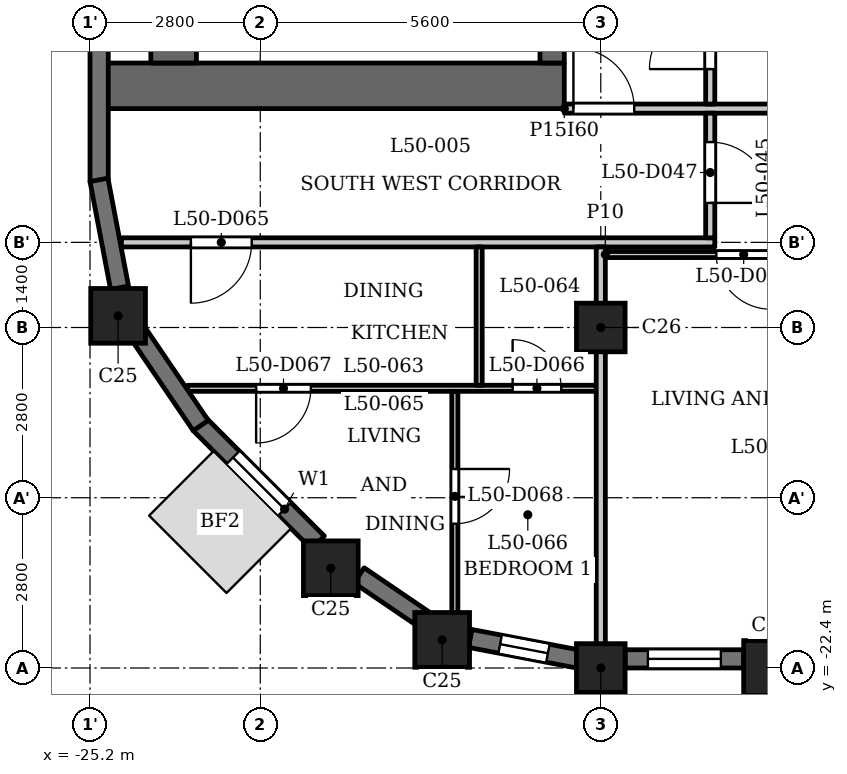
"""IFC4 building model, lengths in metres.
Left out: names, types, materials, properties, quantities, classifications, styles, units other than length and angle.
Written with IfcOpenShell. Run it as: python <this file> out.ifc"""

import sys

from ifc_helpers import new_model, si_unit, direction, frame, frame_2d, origin, origin_2d, place, context, subcontext, project, spatial, rectangle, extrude, element, fill, save


model = new_model("IFC4")
c1 = context("Model", 3, precision=1e-05, world=origin(), true_north=direction((0.0, 1.0)))
c2 = subcontext(c1, "Body", "Model", "MODEL_VIEW")
j1 = project(units=[si_unit("LENGTHUNIT", "METRE"), si_unit("PLANEANGLEUNIT", "RADIAN")], contexts=[c1])
p1 = place(None, origin())
s1 = spatial("IfcSite", under=j1, at=p1, CompositionType="ELEMENT")
p2 = place(p1, origin())
s2 = spatial("IfcBuilding", under=s1, at=p2, CompositionType="ELEMENT")
p3 = place(p2, frame((0.0, 0.0, 195.9)))
s3 = spatial("IfcBuildingStorey", under=s2, at=p3, CompositionType="ELEMENT", Elevation=195.9)
for number, where, z_axis, x_axis in (
    (1, (-19.409, -21.938, 0.0), (0.0, 0.0, 1.0), (1.0, 0.0, 0.0)),
    (2, (-14.0, -22.4, 0.0), (0.0, 0.0, 1.0), (1.0, 0.0, 0.0)),
    (3, (-24.738, -16.609, 0.0), (0.0, 0.0, 1.0), (1.0, 0.0, 0.0)),
    (4, (-21.24, -20.76, 0.0), (0.0, 0.0, 1.0), (1.0, 0.0, 0.0)),
):
    element("IfcColumn", number, at=place(p3, frame(where, z_axis=z_axis, x_axis=x_axis)), inside=s3, PredefinedType="COLUMN", context=c2, shape_type="SweptSolid", body=[
        extrude(rectangle(XDim=0.9, YDim=0.9, at=origin_2d()), origin(), (0.0, 0.0, 1.0), 3.5),
    ])
for number, where, z_axis, x_axis in (
    (5, (-16.8, -22.4, 0.0), (0.0, 0.0, 1.0), (1.0, 0.0, 0.0)),
    (6, (-16.8, -16.8, 0.0), (0.0, 0.0, 1.0), (1.0, 0.0, 0.0)),
):
    element("IfcColumn", number, at=place(p3, frame(where, z_axis=z_axis, x_axis=x_axis)), inside=s3, PredefinedType="COLUMN", context=c2, shape_type="SweptSolid", body=[
        extrude(rectangle(XDim=0.8, YDim=0.8, at=origin_2d()), origin(), (0.0, 0.0, 1.0), 3.5),
    ])
p4 = place(p3, frame((-23.397, -18.391, 0.0), z_axis=(0.0, 0.0, 1.0), x_axis=(0.707106781187, -0.707106781187, 0.0)))
e7 = element("IfcWall", 7, at=p4, inside=s3, PredefinedType="SOLIDWALL", context=c2, shape_type="SweptSolid", body=[
    extrude(rectangle(XDim=2.75, YDim=0.3, at=frame_2d((1.375, 0.0))), origin(), (0.0, 0.0, 1.0), 2.5),
])
p5 = place(p4, frame((0.775, 0.0, 0.6)))
e8 = element("IfcOpeningElement", 8, at=p5, cuts=e7, PredefinedType="OPENING", context=c2, shape_type="SweptSolid", body=[
    extrude(rectangle(XDim=1.2, YDim=1.55, at=frame_2d((0.6, 0.775))), frame((0.0, 0.16, 0.0), z_axis=(0.0, -1.0, 0.0), x_axis=(1.0, 0.0, 0.0)), (0.0, 0.0, 1.0), 0.32),
])
p6 = place(p3, frame((-20.775, -20.876, 0.0), z_axis=(0.0, 0.0, 1.0), x_axis=(0.827075824828, -0.562090366388, 0.0)))
e9 = element("IfcWall", 9, at=p6, inside=s3, PredefinedType="SOLIDWALL", context=c2, shape_type="SweptSolid", body=[
    extrude(rectangle(XDim=1.277, YDim=0.3, at=frame_2d((0.638, 0.0))), origin(), (0.0, 0.0, 1.0), 2.5),
])
p7 = place(p3, frame((-18.946, -21.914, 0.0), z_axis=(0.0, 0.0, 1.0), x_axis=(0.98230529033, -0.187286722942, 0.0)))
e10 = element("IfcWall", 10, at=p7, inside=s3, PredefinedType="SOLIDWALL", context=c2, shape_type="SweptSolid", body=[
    extrude(rectangle(XDim=1.799, YDim=0.3, at=frame_2d((0.899, 0.0))), origin(), (0.0, 0.0, 1.0), 2.5),
])
p8 = place(p7, frame((0.5, 0.0, 0.6)))
e11 = element("IfcOpeningElement", 11, at=p8, cuts=e10, PredefinedType="OPENING", context=c2, shape_type="SweptSolid", body=[
    extrude(rectangle(XDim=0.8, YDim=1.55, at=frame_2d((0.4, 0.775))), frame((0.0, 0.16, 0.0), z_axis=(0.0, -1.0, 0.0), x_axis=(1.0, 0.0, 0.0)), (0.0, 0.0, 1.0), 0.32),
])
p9 = place(p3, frame((-16.4, -22.25, 0.0), z_axis=(0.0, 0.0, 1.0), x_axis=(1.0, 0.0, 0.0)))
e12 = element("IfcWall", 12, at=p9, inside=s3, PredefinedType="SOLIDWALL", context=c2, shape_type="SweptSolid", body=[
    extrude(rectangle(XDim=1.95, YDim=0.3, at=frame_2d((0.975, 0.0))), origin(), (0.0, 0.0, 1.0), 2.5),
])
p10 = place(p9, frame((0.375, 0.0, 0.6)))
e13 = element("IfcOpeningElement", 13, at=p10, cuts=e12, PredefinedType="OPENING", context=c2, shape_type="SweptSolid", body=[
    extrude(rectangle(XDim=1.2, YDim=1.55, at=frame_2d((0.6, 0.775))), frame((0.0, 0.16, 0.0), z_axis=(0.0, -1.0, 0.0), x_axis=(1.0, 0.0, 0.0)), (0.0, 0.0, 1.0), 0.32),
])
p11 = place(p3, frame((-25.05, -11.65, 0.0), z_axis=(0.0, 0.0, 1.0), x_axis=(0.0, -1.0, 0.0)))
e14 = element("IfcWall", 14, at=p11, inside=s3, PredefinedType="SOLIDWALL", context=c2, shape_type="SweptSolid", body=[
    extrude(rectangle(XDim=2.75, YDim=0.3, at=frame_2d((1.375, 0.0))), origin(), (0.0, 0.0, 1.0), 2.5),
])
for number, where, z_axis, x_axis in (
    (15, (-25.053, -14.372, 0.0), (0.0, 0.0, 1.0), (0.187, -0.982, 0.0)),
    (16, (-24.394, -16.919, 0.0), (0.0, 0.0, 1.0), (0.562, -0.827, 0.0)),
):
    element("IfcWall", number, at=place(p3, frame(where, z_axis=z_axis, x_axis=x_axis)), inside=s3, PredefinedType="SOLIDWALL", context=c2, shape_type="SweptSolid", body=[
        extrude(rectangle(XDim=1.806, YDim=0.3, at=frame_2d((0.903, 0.0))), origin(), (0.0, 0.0, 1.0), 2.5),
    ])
p12 = place(p3, frame((-17.4, -12.825, 0.0), z_axis=(0.0, 0.0, 1.0), x_axis=(-1.0, 0.0, 0.0)))
e17 = element("IfcWall", 17, at=p12, inside=s3, PredefinedType="SHEAR", context=c2, shape_type="SweptSolid", body=[
    extrude(rectangle(XDim=7.6, YDim=0.75, at=frame_2d((3.8, 0.0))), origin(), (0.0, 0.0, 1.0), 3.2),
])
p13 = place(p3, frame((-17.6, -12.45, 0.0), z_axis=(0.0, 0.0, 1.0), x_axis=(0.0, 1.0, 0.0)))
e18 = element("IfcWall", 18, at=p13, inside=s3, PredefinedType="SHEAR", context=c2, shape_type="SweptSolid", body=[
    extrude(rectangle(XDim=24.9, YDim=0.4, at=frame_2d((12.45, 0.0))), origin(), (0.0, 0.0, 1.0), 3.2),
])
p14 = place(p13, frame((6.325, 0.0, 0.0)))
e19 = element("IfcOpeningElement", 19, at=p14, cuts=e18, PredefinedType="OPENING", context=c2, shape_type="SweptSolid", body=[
    extrude(rectangle(XDim=0.9, YDim=2.1, at=frame_2d((0.45, 1.05))), frame((0.0, 0.21, 0.0), z_axis=(0.0, -1.0, 0.0), x_axis=(1.0, 0.0, 0.0)), (0.0, 0.0, 1.0), 0.42),
])
p15 = place(p13, frame((9.925, 0.0, 0.0)))
e20 = element("IfcOpeningElement", 20, at=p15, cuts=e18, PredefinedType="OPENING", context=c2, shape_type="SweptSolid", body=[
    extrude(rectangle(XDim=0.9, YDim=2.1, at=frame_2d((0.45, 1.05))), frame((0.0, 0.21, 0.0), z_axis=(0.0, -1.0, 0.0), x_axis=(1.0, 0.0, 0.0)), (0.0, 0.0, 1.0), 0.42),
])
p16 = place(p13, frame((15.6, 0.0, 0.0)))
e21 = element("IfcOpeningElement", 21, at=p16, cuts=e18, PredefinedType="OPENING", context=c2, shape_type="SweptSolid", body=[
    extrude(rectangle(XDim=1.1, YDim=2.1, at=frame_2d((0.55, 1.05))), frame((0.0, 0.21, 0.0), z_axis=(0.0, -1.0, 0.0), x_axis=(1.0, 0.0, 0.0)), (0.0, 0.0, 1.0), 0.42),
])
p17 = place(p13, frame((18.0, 0.0, 0.0)))
e22 = element("IfcOpeningElement", 22, at=p17, cuts=e18, PredefinedType="OPENING", context=c2, shape_type="SweptSolid", body=[
    extrude(rectangle(XDim=1.1, YDim=2.1, at=frame_2d((0.55, 1.05))), frame((0.0, 0.21, 0.0), z_axis=(0.0, -1.0, 0.0), x_axis=(1.0, 0.0, 0.0)), (0.0, 0.0, 1.0), 0.42),
])
p18 = place(p13, frame((23.025, 0.0, 0.0)))
e23 = element("IfcOpeningElement", 23, at=p18, cuts=e18, PredefinedType="OPENING", context=c2, shape_type="SweptSolid", body=[
    extrude(rectangle(XDim=1.1, YDim=2.1, at=frame_2d((0.55, 1.05))), frame((0.0, 0.21, 0.0), z_axis=(0.0, -1.0, 0.0), x_axis=(1.0, 0.0, 0.0)), (0.0, 0.0, 1.0), 0.42),
])
p19 = place(p13, frame((0.775, 0.0, 0.0)))
e24 = element("IfcOpeningElement", 24, at=p19, cuts=e18, PredefinedType="OPENING", context=c2, shape_type="SweptSolid", body=[
    extrude(rectangle(XDim=1.1, YDim=2.1, at=frame_2d((0.55, 1.05))), frame((0.0, 0.21, 0.0), z_axis=(0.0, -1.0, 0.0), x_axis=(1.0, 0.0, 0.0)), (0.0, 0.0, 1.0), 0.42),
])
p20 = place(p13, frame((12.925, 0.0, 0.0)))
e25 = element("IfcOpeningElement", 25, at=p20, cuts=e18, PredefinedType="OPENING", context=c2, shape_type="SweptSolid", body=[
    extrude(rectangle(XDim=1.8, YDim=2.1, at=frame_2d((0.9, 1.05))), frame((0.0, 0.21, 0.0), z_axis=(0.0, -1.0, 0.0), x_axis=(1.0, 0.0, 0.0)), (0.0, 0.0, 1.0), 0.42),
])
p21 = place(p3, frame((-23.825, -12.45, 0.0), z_axis=(0.0, 0.0, 1.0), x_axis=(0.0, 1.0, 0.0)))
e26 = element("IfcWall", 26, at=p21, inside=s3, PredefinedType="SHEAR", context=c2, shape_type="SweptSolid", body=[
    extrude(rectangle(XDim=24.9, YDim=0.75, at=frame_2d((12.45, 0.0))), origin(), (0.0, 0.0, 1.0), 3.2),
])
p22 = place(p3, frame((-23.594, -17.8, 0.0), z_axis=(0.0, 0.0, 1.0), x_axis=(1.0, 0.0, 0.0)))
e27 = element("IfcWall", 27, at=p22, inside=s3, PredefinedType="PARTITIONING", context=c2, shape_type="SweptSolid", body=[
    extrude(rectangle(XDim=6.719, YDim=0.1, at=frame_2d((3.359, 0.0))), origin(), (0.0, 0.0, 1.0), 3.2),
])
p23 = place(p22, frame((5.344, 0.0, 0.0)))
e28 = element("IfcOpeningElement", 28, at=p23, cuts=e27, PredefinedType="OPENING", context=c2, shape_type="SweptSolid", body=[
    extrude(rectangle(XDim=0.8, YDim=2.1, at=frame_2d((0.4, 1.05))), frame((0.0, 0.06, 0.0), z_axis=(0.0, -1.0, 0.0), x_axis=(1.0, 0.0, 0.0)), (0.0, 0.0, 1.0), 0.12),
])
p24 = place(p22, frame((1.126, 0.0, 0.0)))
e29 = element("IfcOpeningElement", 29, at=p24, cuts=e27, PredefinedType="OPENING", context=c2, shape_type="SweptSolid", body=[
    extrude(rectangle(XDim=0.9, YDim=2.1, at=frame_2d((0.45, 1.05))), frame((0.0, 0.06, 0.0), z_axis=(0.0, -1.0, 0.0), x_axis=(1.0, 0.0, 0.0)), (0.0, 0.0, 1.0), 0.12),
])
p25 = place(p3, frame((-16.725, -15.6, 0.0), z_axis=(0.0, 0.0, 1.0), x_axis=(1.0, 0.0, 0.0)))
e30 = element("IfcWall", 30, at=p25, inside=s3, PredefinedType="PARTITIONING", context=c2, shape_type="SweptSolid", body=[
    extrude(rectangle(XDim=33.45, YDim=0.1, at=frame_2d((16.725, 0.0))), origin(), (0.0, 0.0, 1.0), 3.2),
])
p26 = place(p25, frame((4.075, 0.0, 0.0)))
e31 = element("IfcOpeningElement", 31, at=p26, cuts=e30, PredefinedType="OPENING", context=c2, shape_type="SweptSolid", body=[
    extrude(rectangle(XDim=0.8, YDim=2.1, at=frame_2d((0.4, 1.05))), frame((0.0, 0.06, 0.0), z_axis=(0.0, -1.0, 0.0), x_axis=(1.0, 0.0, 0.0)), (0.0, 0.0, 1.0), 0.12),
])
p27 = place(p25, frame((1.825, 0.0, 0.0)))
e32 = element("IfcOpeningElement", 32, at=p27, cuts=e30, PredefinedType="OPENING", context=c2, shape_type="SweptSolid", body=[
    extrude(rectangle(XDim=0.9, YDim=2.1, at=frame_2d((0.45, 1.05))), frame((0.0, 0.06, 0.0), z_axis=(0.0, -1.0, 0.0), x_axis=(1.0, 0.0, 0.0)), (0.0, 0.0, 1.0), 0.12),
])
p28 = place(p25, frame((9.675, 0.0, 0.0)))
e33 = element("IfcOpeningElement", 33, at=p28, cuts=e30, PredefinedType="OPENING", context=c2, shape_type="SweptSolid", body=[
    extrude(rectangle(XDim=0.8, YDim=2.1, at=frame_2d((0.4, 1.05))), frame((0.0, 0.06, 0.0), z_axis=(0.0, -1.0, 0.0), x_axis=(1.0, 0.0, 0.0)), (0.0, 0.0, 1.0), 0.12),
])
p29 = place(p25, frame((14.025, 0.0, 0.0)))
e34 = element("IfcOpeningElement", 34, at=p29, cuts=e30, PredefinedType="OPENING", context=c2, shape_type="SweptSolid", body=[
    extrude(rectangle(XDim=0.9, YDim=2.1, at=frame_2d((0.45, 1.05))), frame((0.0, 0.06, 0.0), z_axis=(0.0, -1.0, 0.0), x_axis=(1.0, 0.0, 0.0)), (0.0, 0.0, 1.0), 0.12),
])
p30 = place(p25, frame((20.875, 0.0, 0.0)))
e35 = element("IfcOpeningElement", 35, at=p30, cuts=e30, PredefinedType="OPENING", context=c2, shape_type="SweptSolid", body=[
    extrude(rectangle(XDim=0.8, YDim=2.1, at=frame_2d((0.4, 1.05))), frame((0.0, 0.06, 0.0), z_axis=(0.0, -1.0, 0.0), x_axis=(1.0, 0.0, 0.0)), (0.0, 0.0, 1.0), 0.12),
])
p31 = place(p25, frame((25.225, 0.0, 0.0)))
e36 = element("IfcOpeningElement", 36, at=p31, cuts=e30, PredefinedType="OPENING", context=c2, shape_type="SweptSolid", body=[
    extrude(rectangle(XDim=0.9, YDim=2.1, at=frame_2d((0.45, 1.05))), frame((0.0, 0.06, 0.0), z_axis=(0.0, -1.0, 0.0), x_axis=(1.0, 0.0, 0.0)), (0.0, 0.0, 1.0), 0.12),
])
p32 = place(p25, frame((28.475, 0.0, 0.0)))
e37 = element("IfcOpeningElement", 37, at=p32, cuts=e30, PredefinedType="OPENING", context=c2, shape_type="SweptSolid", body=[
    extrude(rectangle(XDim=0.8, YDim=2.1, at=frame_2d((0.4, 1.05))), frame((0.0, 0.06, 0.0), z_axis=(0.0, -1.0, 0.0), x_axis=(1.0, 0.0, 0.0)), (0.0, 0.0, 1.0), 0.12),
])
p33 = place(p25, frame((30.675, 0.0, 0.0)))
e38 = element("IfcOpeningElement", 38, at=p33, cuts=e30, PredefinedType="OPENING", context=c2, shape_type="SweptSolid", body=[
    extrude(rectangle(XDim=0.9, YDim=2.1, at=frame_2d((0.45, 1.05))), frame((0.0, 0.06, 0.0), z_axis=(0.0, -1.0, 0.0), x_axis=(1.0, 0.0, 0.0)), (0.0, 0.0, 1.0), 0.12),
])
p34 = place(p3, frame((-24.684, -15.4, 0.0), z_axis=(0.0, 0.0, 1.0), x_axis=(1.0, 0.0, 0.0)))
e39 = element("IfcWall", 39, at=p34, inside=s3, PredefinedType="PARTITIONING", context=c2, shape_type="SweptSolid", body=[
    extrude(rectangle(XDim=9.759, YDim=0.15, at=frame_2d((4.879, 0.0))), origin(), (0.0, 0.0, 1.0), 3.2),
])
p35 = place(p34, frame((1.143, 0.0, 0.0)))
e40 = element("IfcOpeningElement", 40, at=p35, cuts=e39, PredefinedType="OPENING", context=c2, shape_type="SweptSolid", body=[
    extrude(rectangle(XDim=1.0, YDim=2.1, at=frame_2d((0.5, 1.05))), frame((0.0, 0.085, 0.0), z_axis=(0.0, -1.0, 0.0), x_axis=(1.0, 0.0, 0.0)), (0.0, 0.0, 1.0), 0.17),
])
p36 = place(p3, frame((-17.4, -13.2, 0.0), z_axis=(0.0, 0.0, 1.0), x_axis=(1.0, 0.0, 0.0)))
e41 = element("IfcWall", 41, at=p36, inside=s3, PredefinedType="PARTITIONING", context=c2, shape_type="SweptSolid", body=[
    extrude(rectangle(XDim=34.8, YDim=0.15, at=frame_2d((17.4, 0.0))), origin(), (0.0, 0.0, 1.0), 3.2),
])
p37 = place(p36, frame((0.15, 0.0, 0.0)))
e42 = element("IfcOpeningElement", 42, at=p37, cuts=e41, PredefinedType="OPENING", context=c2, shape_type="SweptSolid", body=[
    extrude(rectangle(XDim=1.0, YDim=2.1, at=frame_2d((0.5, 1.05))), frame((0.0, 0.085, 0.0), z_axis=(0.0, -1.0, 0.0), x_axis=(1.0, 0.0, 0.0)), (0.0, 0.0, 1.0), 0.17),
])
p38 = place(p36, frame((33.55, 0.0, 0.0)))
e43 = element("IfcOpeningElement", 43, at=p38, cuts=e41, PredefinedType="OPENING", context=c2, shape_type="SweptSolid", body=[
    extrude(rectangle(XDim=1.0, YDim=2.1, at=frame_2d((0.5, 1.05))), frame((0.0, 0.085, 0.0), z_axis=(0.0, -1.0, 0.0), x_axis=(1.0, 0.0, 0.0)), (0.0, 0.0, 1.0), 0.17),
])
p39 = place(p36, frame((15.7, 0.0, 0.0)))
e44 = element("IfcOpeningElement", 44, at=p39, cuts=e41, PredefinedType="OPENING", context=c2, shape_type="SweptSolid", body=[
    extrude(rectangle(XDim=1.0, YDim=2.1, at=frame_2d((0.5, 1.05))), frame((0.0, 0.085, 0.0), z_axis=(0.0, -1.0, 0.0), x_axis=(1.0, 0.0, 0.0)), (0.0, 0.0, 1.0), 0.17),
])
p40 = place(p36, frame((26.9, 0.0, 0.0)))
e45 = element("IfcOpeningElement", 45, at=p40, cuts=e41, PredefinedType="OPENING", context=c2, shape_type="SweptSolid", body=[
    extrude(rectangle(XDim=1.0, YDim=2.1, at=frame_2d((0.5, 1.05))), frame((0.0, 0.085, 0.0), z_axis=(0.0, -1.0, 0.0), x_axis=(1.0, 0.0, 0.0)), (0.0, 0.0, 1.0), 0.17),
])
p41 = place(p3, frame((-19.2, -21.92, 0.0), z_axis=(0.0, 0.0, 1.0), x_axis=(0.0, 1.0, 0.0)))
e46 = element("IfcWall", 46, at=p41, inside=s3, PredefinedType="PARTITIONING", context=c2, shape_type="SweptSolid", body=[
    extrude(rectangle(XDim=4.07, YDim=0.1, at=frame_2d((2.035, 0.0))), origin(), (0.0, 0.0, 1.0), 3.2),
])
p42 = place(p41, frame((1.893, 0.0, 0.0)))
e47 = element("IfcOpeningElement", 47, at=p42, cuts=e46, PredefinedType="OPENING", context=c2, shape_type="SweptSolid", body=[
    extrude(rectangle(XDim=0.9, YDim=2.1, at=frame_2d((0.45, 1.05))), frame((0.0, 0.06, 0.0), z_axis=(0.0, -1.0, 0.0), x_axis=(1.0, 0.0, 0.0)), (0.0, 0.0, 1.0), 0.12),
])
p43 = place(p3, frame((-18.8, -17.75, 0.0), z_axis=(0.0, 0.0, 1.0), x_axis=(0.0, 1.0, 0.0)))
e48 = element("IfcWall", 48, at=p43, inside=s3, PredefinedType="PARTITIONING", context=c2, shape_type="SweptSolid", body=[
    extrude(rectangle(XDim=2.275, YDim=0.1, at=frame_2d((1.137, 0.0))), origin(), (0.0, 0.0, 1.0), 3.2),
])
p44 = place(p3, frame((-16.8, -22.31, 0.0), z_axis=(0.0, 0.0, 1.0), x_axis=(0.0, 1.0, 0.0)))
e49 = element("IfcWall", 49, at=p44, inside=s3, PredefinedType="PARTITIONING", context=c2, shape_type="SweptSolid", body=[
    extrude(rectangle(XDim=6.835, YDim=0.15, at=frame_2d((3.417, 0.0))), origin(), (0.0, 0.0, 1.0), 2.55),
])
p45 = place(p3, frame((-15.0, -15.325, 0.0), z_axis=(0.0, 0.0, 1.0), x_axis=(0.0, 1.0, 0.0)))
e50 = element("IfcWall", 50, at=p45, inside=s3, PredefinedType="PARTITIONING", context=c2, shape_type="SweptSolid", body=[
    extrude(rectangle(XDim=2.05, YDim=0.15, at=frame_2d((1.025, 0.0))), origin(), (0.0, 0.0, 1.0), 3.2),
])
p46 = place(p45, frame((0.574, 0.0, 0.0)))
e51 = element("IfcOpeningElement", 51, at=p46, cuts=e50, PredefinedType="OPENING", context=c2, shape_type="SweptSolid", body=[
    extrude(rectangle(XDim=1.0, YDim=2.1, at=frame_2d((0.5, 1.05))), frame((0.0, 0.085, 0.0), z_axis=(0.0, -1.0, 0.0), x_axis=(1.0, 0.0, 0.0)), (0.0, 0.0, 1.0), 0.17),
])
p47 = place(p3, frame((-15.0, -13.125, 0.0), z_axis=(0.0, 0.0, 1.0), x_axis=(0.0, 1.0, 0.0)))
e52 = element("IfcWall", 52, at=p47, inside=s3, PredefinedType="PARTITIONING", context=c2, shape_type="SweptSolid", body=[
    extrude(rectangle(XDim=6.356, YDim=0.15, at=frame_2d((3.178, 0.0))), origin(), (0.0, 0.0, 1.0), 3.2),
])
p48 = place(p47, frame((0.575, 0.0, 0.0)))
e53 = element("IfcOpeningElement", 53, at=p48, cuts=e52, PredefinedType="OPENING", context=c2, shape_type="SweptSolid", body=[
    extrude(rectangle(XDim=1.0, YDim=2.1, at=frame_2d((0.5, 1.05))), frame((0.0, 0.085, 0.0), z_axis=(0.0, -1.0, 0.0), x_axis=(1.0, 0.0, 0.0)), (0.0, 0.0, 1.0), 0.17),
])
p49 = place(p48, origin())
e54 = element("IfcDoor", 54, at=p49, inside=s3, OperationType="SINGLE_SWING_RIGHT", PredefinedType="DOOR", context=c2, shape_type="SweptSolid", body=[
    extrude(rectangle(XDim=1.0, YDim=2.1, at=frame_2d((0.5, 1.05))), frame((0.0, 0.025, 0.0), z_axis=(0.0, -1.0, 0.0), x_axis=(1.0, 0.0, 0.0)), (0.0, 0.0, 1.0), 0.05),
])
fill(e53, e54)
p50 = place(p37, origin())
e55 = element("IfcDoor", 55, at=p50, inside=s3, OperationType="SINGLE_SWING_RIGHT", PredefinedType="DOOR", context=c2, shape_type="SweptSolid", body=[
    extrude(rectangle(XDim=1.0, YDim=2.1, at=frame_2d((0.5, 1.05))), frame((0.0, 0.025, 0.0), z_axis=(0.0, -1.0, 0.0), x_axis=(1.0, 0.0, 0.0)), (0.0, 0.0, 1.0), 0.05),
])
fill(e42, e55)
p51 = place(p46, origin())
e56 = element("IfcDoor", 56, at=p51, inside=s3, OperationType="SINGLE_SWING_LEFT", PredefinedType="DOOR", context=c2, shape_type="SweptSolid", body=[
    extrude(rectangle(XDim=1.0, YDim=2.1, at=frame_2d((0.5, 1.05))), frame((0.0, 0.025, 0.0), z_axis=(0.0, -1.0, 0.0), x_axis=(1.0, 0.0, 0.0)), (0.0, 0.0, 1.0), 0.05),
])
fill(e51, e56)
p52 = place(p27, origin())
e57 = element("IfcDoor", 57, at=p52, inside=s3, OperationType="SINGLE_SWING_RIGHT", PredefinedType="DOOR", context=c2, shape_type="SweptSolid", body=[
    extrude(rectangle(XDim=0.9, YDim=2.1, at=frame_2d((0.45, 1.05))), frame((0.0, 0.025, 0.0), z_axis=(0.0, -1.0, 0.0), x_axis=(1.0, 0.0, 0.0)), (0.0, 0.0, 1.0), 0.05),
])
fill(e32, e57)
p53 = place(p35, origin())
e58 = element("IfcDoor", 58, at=p53, inside=s3, OperationType="SINGLE_SWING_LEFT", PredefinedType="DOOR", context=c2, shape_type="SweptSolid", body=[
    extrude(rectangle(XDim=1.0, YDim=2.1, at=frame_2d((0.5, 1.05))), frame((0.0, 0.025, 0.0), z_axis=(0.0, -1.0, 0.0), x_axis=(1.0, 0.0, 0.0)), (0.0, 0.0, 1.0), 0.05),
])
fill(e40, e58)
p54 = place(p23, origin())
e59 = element("IfcDoor", 59, at=p54, inside=s3, OperationType="SINGLE_SWING_RIGHT", PredefinedType="DOOR", context=c2, shape_type="SweptSolid", body=[
    extrude(rectangle(XDim=0.8, YDim=2.1, at=frame_2d((0.4, 1.05))), frame((0.0, 0.025, 0.0), z_axis=(0.0, -1.0, 0.0), x_axis=(1.0, 0.0, 0.0)), (0.0, 0.0, 1.0), 0.05),
])
fill(e28, e59)
p55 = place(p24, origin())
e60 = element("IfcDoor", 60, at=p55, inside=s3, OperationType="SINGLE_SWING_LEFT", PredefinedType="DOOR", context=c2, shape_type="SweptSolid", body=[
    extrude(rectangle(XDim=0.9, YDim=2.1, at=frame_2d((0.45, 1.05))), frame((0.0, 0.025, 0.0), z_axis=(0.0, -1.0, 0.0), x_axis=(1.0, 0.0, 0.0)), (0.0, 0.0, 1.0), 0.05),
])
fill(e29, e60)
p56 = place(p42, origin())
e61 = element("IfcDoor", 61, at=p56, inside=s3, OperationType="SINGLE_SWING_RIGHT", PredefinedType="DOOR", context=c2, shape_type="SweptSolid", body=[
    extrude(rectangle(XDim=0.9, YDim=2.1, at=frame_2d((0.45, 1.05))), frame((0.0, 0.025, 0.0), z_axis=(0.0, -1.0, 0.0), x_axis=(1.0, 0.0, 0.0)), (0.0, 0.0, 1.0), 0.05),
])
fill(e47, e61)
p57 = place(p5, origin())
e62 = element("IfcWindow", 62, at=p57, inside=s3, PartitioningType="SINGLE_PANEL", PredefinedType="WINDOW", context=c2, shape_type="SweptSolid", body=[
    extrude(rectangle(XDim=1.2, YDim=1.55, at=frame_2d((0.6, 0.775))), frame((0.0, 0.03, 0.0), z_axis=(0.0, -1.0, 0.0), x_axis=(1.0, 0.0, 0.0)), (0.0, 0.0, 1.0), 0.06),
])
fill(e8, e62)
p58 = place(p8, origin())
e63 = element("IfcWindow", 63, at=p58, inside=s3, PartitioningType="SINGLE_PANEL", PredefinedType="WINDOW", context=c2, shape_type="SweptSolid", body=[
    extrude(rectangle(XDim=0.8, YDim=1.55, at=frame_2d((0.4, 0.775))), frame((0.0, 0.03, 0.0), z_axis=(0.0, -1.0, 0.0), x_axis=(1.0, 0.0, 0.0)), (0.0, 0.0, 1.0), 0.06),
])
fill(e11, e63)
p59 = place(p10, origin())
e64 = element("IfcWindow", 64, at=p59, inside=s3, PartitioningType="SINGLE_PANEL", PredefinedType="WINDOW", context=c2, shape_type="SweptSolid", body=[
    extrude(rectangle(XDim=1.2, YDim=1.55, at=frame_2d((0.6, 0.775))), frame((0.0, 0.03, 0.0), z_axis=(0.0, -1.0, 0.0), x_axis=(1.0, 0.0, 0.0)), (0.0, 0.0, 1.0), 0.06),
])
fill(e13, e64)
save(model, sys.argv[1])
